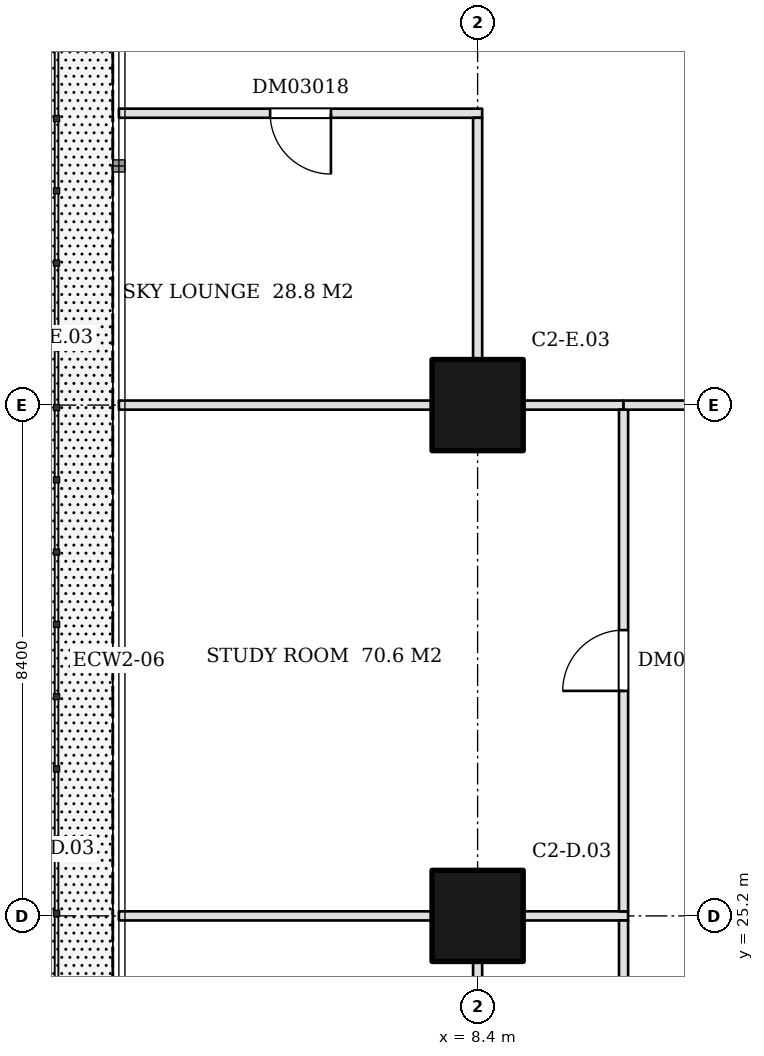
"""IFC4 building model, lengths in metres.
Left out: names, types, materials, properties, quantities, classifications, styles, units other than length and angle.
Written with IfcOpenShell. Run it as: python <this file> out.ifc"""

import sys

from ifc_helpers import new_model, si_unit, direction, frame, frame_2d, origin, origin_2d, place, context, subcontext, project, spatial, rectangle, extrude, element, fill, save


model = new_model("IFC4")
c1 = context("Model", 3, precision=1e-05, world=origin(), true_north=direction((0.0, 1.0)))
c2 = subcontext(c1, "Body", "Model", "MODEL_VIEW")
j1 = project(units=[si_unit("LENGTHUNIT", "METRE"), si_unit("PLANEANGLEUNIT", "RADIAN")], contexts=[c1])
p1 = place(None, origin())
s1 = spatial("IfcSite", under=j1, at=p1, CompositionType="ELEMENT")
p2 = place(p1, origin())
s2 = spatial("IfcBuilding", under=s1, at=p2, CompositionType="ELEMENT")
p3 = place(p2, frame((0.0, 0.0, 19.8)))
s3 = spatial("IfcBuildingStorey", under=s2, at=p3, CompositionType="ELEMENT", Elevation=19.8)
for number, where, z_axis, x_axis in (
    (1, (8.4, 25.2, 0.0), (0.0, 0.0, 1.0), (1.0, 0.0, 0.0)),
    (2, (8.4, 33.6, 0.0), (0.0, 0.0, 1.0), (1.0, 0.0, 0.0)),
):
    element("IfcColumn", number, at=place(p3, frame(where, z_axis=z_axis, x_axis=x_axis)), inside=s3, PredefinedType="COLUMN", context=c2, shape_type="SweptSolid", body=[
        extrude(rectangle(XDim=1.5, YDim=1.5, at=origin_2d()), origin(), (0.0, 0.0, 1.0), 5.12),
    ])
for number, where, z_axis, x_axis in (
    (3, (2.5, 25.2, 0.0), (0.0, 0.0, 1.0), (1.0, 0.0, 0.0)),
    (4, (2.5, 33.6, 0.0), (0.0, 0.0, 1.0), (1.0, 0.0, 0.0)),
):
    element("IfcWall", number, at=place(p3, frame(where, z_axis=z_axis, x_axis=x_axis)), inside=s3, PredefinedType="PARTITIONING", context=c2, shape_type="SweptSolid", body=[
        extrude(rectangle(XDim=5.15, YDim=0.15, at=frame_2d((2.575, 0.0))), origin(), (0.0, 0.0, 1.0), 5.12),
    ])
p4 = place(p3, frame((2.5, 38.4, 0.0), z_axis=(0.0, 0.0, 1.0), x_axis=(1.0, 0.0, 0.0)))
e5 = element("IfcWall", 5, at=p4, inside=s3, PredefinedType="PARTITIONING", context=c2, shape_type="SweptSolid", body=[
    extrude(rectangle(XDim=5.975, YDim=0.15, at=frame_2d((2.988, 0.0))), origin(), (0.0, 0.0, 1.0), 5.12),
])
p5 = place(p4, frame((2.488, 0.0, 0.0)))
e6 = element("IfcOpeningElement", 6, at=p5, cuts=e5, PredefinedType="OPENING", context=c2, shape_type="SweptSolid", body=[
    extrude(rectangle(XDim=1.0, YDim=2.1, at=frame_2d((0.5, 1.05))), frame((0.0, 0.085, 0.0), z_axis=(0.0, -1.0, 0.0), x_axis=(1.0, 0.0, 0.0)), (0.0, 0.0, 1.0), 0.17),
])
p6 = place(p3, frame((8.4, 17.55, 0.0), z_axis=(0.0, 0.0, 1.0), x_axis=(0.0, 1.0, 0.0)))
e7 = element("IfcWall", 7, at=p6, inside=s3, PredefinedType="PARTITIONING", context=c2, shape_type="SweptSolid", body=[
    extrude(rectangle(XDim=6.9, YDim=0.15, at=frame_2d((3.45, 0.0))), origin(), (0.0, 0.0, 1.0), 5.12),
])
p7 = place(p6, frame((2.95, 0.0, 0.0)))
e8 = element("IfcOpeningElement", 8, at=p7, cuts=e7, PredefinedType="OPENING", context=c2, shape_type="SweptSolid", body=[
    extrude(rectangle(XDim=1.0, YDim=2.1, at=frame_2d((0.5, 1.05))), frame((0.0, 0.085, 0.0), z_axis=(0.0, -1.0, 0.0), x_axis=(1.0, 0.0, 0.0)), (0.0, 0.0, 1.0), 0.17),
])
p8 = place(p3, frame((9.15, 25.2, 0.0), z_axis=(0.0, 0.0, 1.0), x_axis=(1.0, 0.0, 0.0)))
e9 = element("IfcWall", 9, at=p8, inside=s3, PredefinedType="PARTITIONING", context=c2, shape_type="SweptSolid", body=[
    extrude(rectangle(XDim=1.725, YDim=0.15, at=frame_2d((0.863, 0.0))), origin(), (0.0, 0.0, 1.0), 5.12),
])
p9 = place(p3, frame((8.4, 34.35, 0.0), z_axis=(0.0, 0.0, 1.0), x_axis=(0.0, 1.0, 0.0)))
e10 = element("IfcWall", 10, at=p9, inside=s3, PredefinedType="PARTITIONING", context=c2, shape_type="SweptSolid", body=[
    extrude(rectangle(XDim=3.975, YDim=0.15, at=frame_2d((1.987, 0.0))), origin(), (0.0, 0.0, 1.0), 5.12),
])
p10 = place(p3, frame((9.15, 33.6, 0.0), z_axis=(0.0, 0.0, 1.0), x_axis=(1.0, 0.0, 0.0)))
e11 = element("IfcWall", 11, at=p10, inside=s3, PredefinedType="PARTITIONING", context=c2, shape_type="SweptSolid", body=[
    extrude(rectangle(XDim=1.65, YDim=0.15, at=frame_2d((0.825, 0.0))), origin(), (0.0, 0.0, 1.0), 5.12),
])
p11 = place(p3, frame((10.8, 14.475, 0.0), z_axis=(0.0, 0.0, 1.0), x_axis=(0.0, 1.0, 0.0)))
e12 = element("IfcWall", 12, at=p11, inside=s3, PredefinedType="PARTITIONING", context=c2, shape_type="SweptSolid", body=[
    extrude(rectangle(XDim=10.65, YDim=0.15, at=frame_2d((5.325, 0.0))), origin(), (0.0, 0.0, 1.0), 5.12),
])
p12 = place(p11, frame((4.825, 0.0, 0.0)))
e13 = element("IfcOpeningElement", 13, at=p12, cuts=e12, PredefinedType="OPENING", context=c2, shape_type="SweptSolid", body=[
    extrude(rectangle(XDim=1.0, YDim=2.1, at=frame_2d((0.5, 1.05))), frame((0.0, 0.085, 0.0), z_axis=(0.0, -1.0, 0.0), x_axis=(1.0, 0.0, 0.0)), (0.0, 0.0, 1.0), 0.17),
])
p13 = place(p3, frame((10.8, 25.275, 0.0), z_axis=(0.0, 0.0, 1.0), x_axis=(0.0, 1.0, 0.0)))
e14 = element("IfcWall", 14, at=p13, inside=s3, PredefinedType="PARTITIONING", context=c2, shape_type="SweptSolid", body=[
    extrude(rectangle(XDim=8.25, YDim=0.15, at=frame_2d((4.125, 0.0))), origin(), (0.0, 0.0, 1.0), 5.12),
])
p14 = place(p13, frame((3.625, 0.0, 0.0)))
e15 = element("IfcOpeningElement", 15, at=p14, cuts=e14, PredefinedType="OPENING", context=c2, shape_type="SweptSolid", body=[
    extrude(rectangle(XDim=1.0, YDim=2.1, at=frame_2d((0.5, 1.05))), frame((0.0, 0.085, 0.0), z_axis=(0.0, -1.0, 0.0), x_axis=(1.0, 0.0, 0.0)), (0.0, 0.0, 1.0), 0.17),
])
p15 = place(p3, frame((10.8, 33.6, 0.0), z_axis=(0.0, 0.0, 1.0), x_axis=(1.0, 0.0, 0.0)))
e16 = element("IfcWall", 16, at=p15, inside=s3, PredefinedType="PARTITIONING", context=c2, shape_type="SweptSolid", body=[
    extrude(rectangle(XDim=5.25, YDim=0.15, at=frame_2d((2.625, 0.0))), origin(), (0.0, 0.0, 1.0), 5.12),
])
p16 = place(p14, origin())
e17 = element("IfcDoor", 17, at=p16, inside=s3, OperationType="SINGLE_SWING_LEFT", PredefinedType="DOOR", context=c2, shape_type="SweptSolid", body=[
    extrude(rectangle(XDim=1.0, YDim=2.1, at=frame_2d((0.5, 1.05))), frame((0.0, 0.025, 0.0), z_axis=(0.0, -1.0, 0.0), x_axis=(1.0, 0.0, 0.0)), (0.0, 0.0, 1.0), 0.05),
])
fill(e15, e17)
p17 = place(p5, frame((1.0, 0.0, 0.0), z_axis=(0.0, 0.0, 1.0), x_axis=(-1.0, 0.0, 0.0)))
e18 = element("IfcDoor", 18, at=p17, inside=s3, OperationType="SINGLE_SWING_LEFT", PredefinedType="DOOR", context=c2, shape_type="SweptSolid", body=[
    extrude(rectangle(XDim=1.0, YDim=2.1, at=frame_2d((0.5, 1.05))), frame((0.0, 0.025, 0.0), z_axis=(0.0, -1.0, 0.0), x_axis=(1.0, 0.0, 0.0)), (0.0, 0.0, 1.0), 0.05),
])
fill(e6, e18)
save(model, sys.argv[1])
